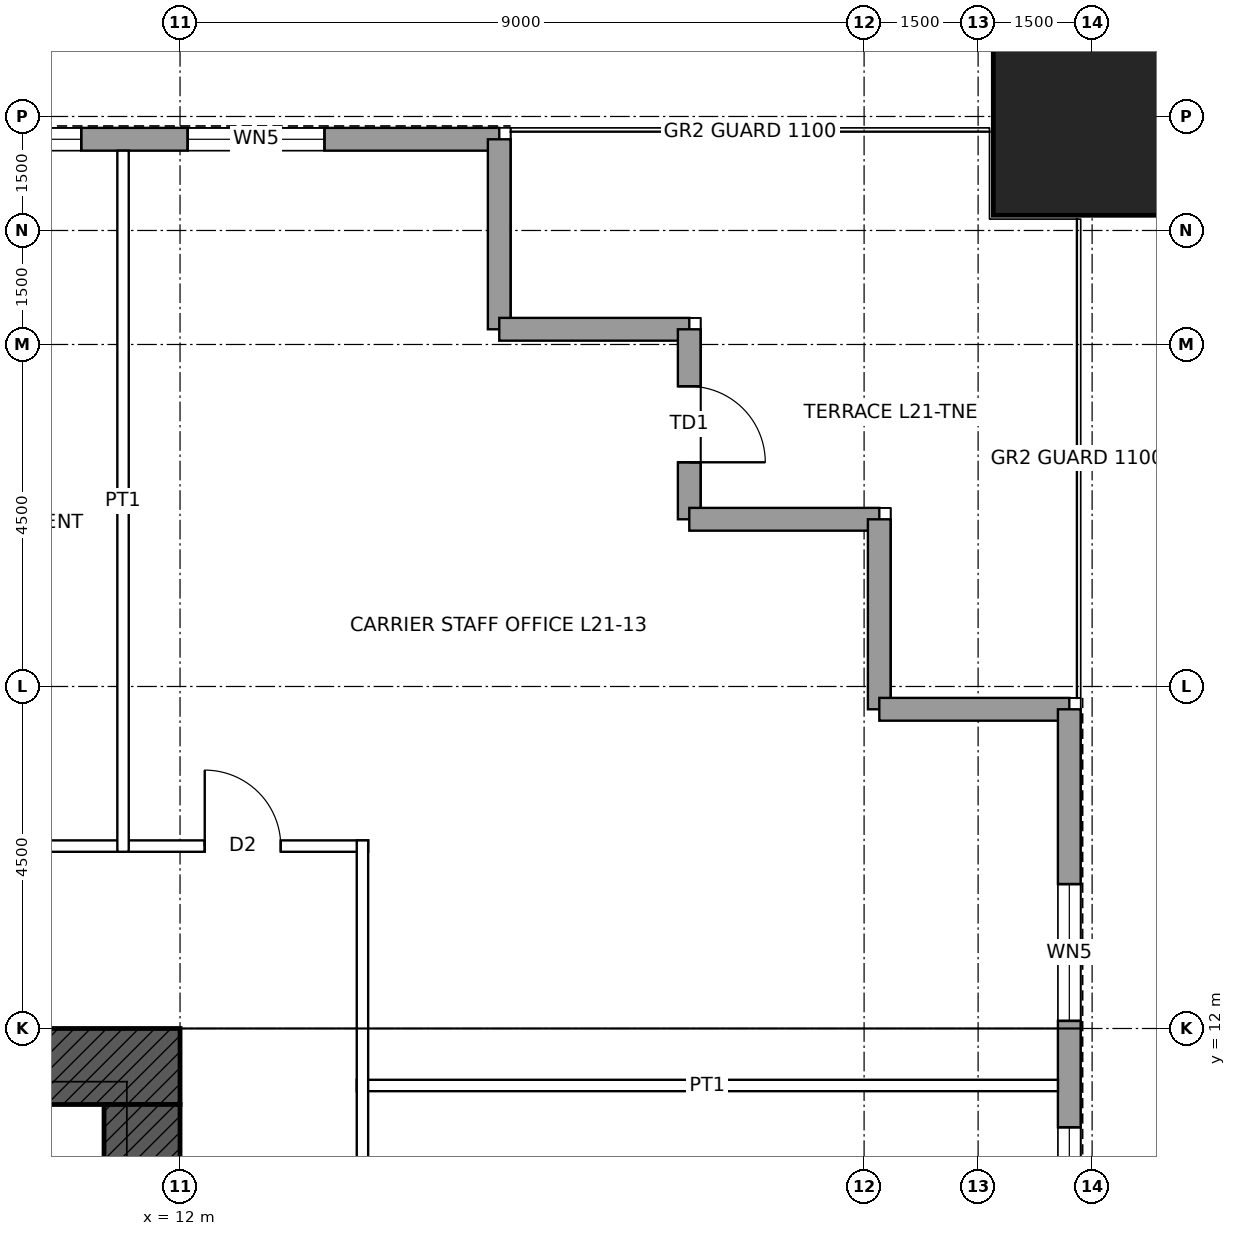
"""IFC4 building model, lengths in metres.
Left out: names, types, materials, properties, quantities, classifications, styles, units other than length and angle.
Written with IfcOpenShell. Run it as: python <this file> out.ifc"""

import sys

from ifc_helpers import new_model, si_unit, direction, frame, frame_2d, origin, origin_2d, place, context, subcontext, project, spatial, rectangle, hollow_rectangle, extrude, element, fill, save


model = new_model("IFC4")
c1 = context("Model", 3, precision=1e-05, world=origin(), true_north=direction((0.0, 1.0)))
c2 = subcontext(c1, "Body", "Model", "MODEL_VIEW")
j1 = project(units=[si_unit("LENGTHUNIT", "METRE"), si_unit("PLANEANGLEUNIT", "RADIAN")], contexts=[c1])
p1 = place(None, origin())
s1 = spatial("IfcSite", under=j1, at=p1, CompositionType="ELEMENT")
p2 = place(p1, origin())
s2 = spatial("IfcBuilding", under=s1, at=p2, CompositionType="ELEMENT")
p3 = place(p2, frame((0.0, 0.0, 108.9)))
s3 = spatial("IfcBuildingStorey", under=s2, at=p3, CompositionType="ELEMENT", Elevation=108.9)
p4 = place(p3, frame((24.0, 24.0, 0.0), z_axis=(0.0, 0.0, 1.0), x_axis=(1.0, 0.0, 0.0)))
e1 = element("IfcColumn", 1, at=p4, inside=s3, PredefinedType="COLUMN", context=c2, shape_type="SweptSolid", body=[
    extrude(hollow_rectangle(XDim=2.6, YDim=2.6, WallThickness=0.13, at=origin_2d()), origin(), (0.0, 0.0, 1.0), 4.5),
])
p5 = place(p3, frame((-12.0, 11.5, 0.0), z_axis=(0.0, 0.0, 1.0), x_axis=(1.0, 0.0, 0.0)))
e2 = element("IfcWall", 2, at=p5, inside=s3, PredefinedType="SHEAR", context=c2, shape_type="SweptSolid", body=[
    extrude(rectangle(XDim=24.0, YDim=1.0, at=frame_2d((12.0, 0.0))), origin(), (0.0, 0.0, 1.0), 4.5),
])
p6 = place(p5, frame((6.25, 0.0, 0.0)))
e3 = element("IfcOpeningElement", 3, at=p6, cuts=e2, PredefinedType="OPENING", context=c2, shape_type="SweptSolid", body=[
    extrude(rectangle(XDim=1.0, YDim=2.4, at=frame_2d((0.5, 1.2))), frame((0.0, 0.51, 0.0), z_axis=(0.0, -1.0, 0.0), x_axis=(1.0, 0.0, 0.0)), (0.0, 0.0, 1.0), 1.02),
])
p7 = place(p5, frame((16.75, 0.0, 0.0)))
e4 = element("IfcOpeningElement", 4, at=p7, cuts=e2, PredefinedType="OPENING", context=c2, shape_type="SweptSolid", body=[
    extrude(rectangle(XDim=1.0, YDim=2.4, at=frame_2d((0.5, 1.2))), frame((0.0, 0.51, 0.0), z_axis=(0.0, -1.0, 0.0), x_axis=(1.0, 0.0, 0.0)), (0.0, 0.0, 1.0), 1.02),
])
p8 = place(p3, frame((11.5, 11.0, 0.0), z_axis=(0.0, 0.0, 1.0), x_axis=(0.0, -1.0, 0.0)))
e5 = element("IfcWall", 5, at=p8, inside=s3, PredefinedType="SHEAR", context=c2, shape_type="SweptSolid", body=[
    extrude(rectangle(XDim=22.0, YDim=1.0, at=frame_2d((11.0, 0.0))), origin(), (0.0, 0.0, 1.0), 4.5),
])
p9 = place(p8, frame((10.5, 0.0, 0.0)))
e6 = element("IfcOpeningElement", 6, at=p9, cuts=e5, PredefinedType="OPENING", context=c2, shape_type="SweptSolid", body=[
    extrude(rectangle(XDim=1.0, YDim=2.4, at=frame_2d((0.5, 1.2))), frame((0.0, 0.51, 0.0), z_axis=(0.0, -1.0, 0.0), x_axis=(1.0, 0.0, 0.0)), (0.0, 0.0, 1.0), 1.02),
])
p10 = place(p3, frame((-16.2, 23.7, 0.0), z_axis=(0.0, 0.0, 1.0), x_axis=(1.0, 0.0, 0.0)))
e7 = element("IfcWall", 7, at=p10, inside=s3, PredefinedType="SOLIDWALL", context=c2, shape_type="SweptSolid", body=[
    extrude(rectangle(XDim=32.4, YDim=0.3, at=frame_2d((16.2, 0.0))), origin(), (0.0, 0.0, 1.0), 4.3),
])
p11 = place(p10, frame((2.3, 0.0, 1.0)))
e8 = element("IfcOpeningElement", 8, at=p11, cuts=e7, PredefinedType="OPENING", context=c2, shape_type="SweptSolid", body=[
    extrude(rectangle(XDim=1.8, YDim=1.2, at=frame_2d((0.9, 0.6))), frame((0.0, 0.16, 0.0), z_axis=(0.0, -1.0, 0.0), x_axis=(1.0, 0.0, 0.0)), (0.0, 0.0, 1.0), 0.32),
])
p12 = place(p10, frame((5.5, 0.0, 1.0)))
e9 = element("IfcOpeningElement", 9, at=p12, cuts=e7, PredefinedType="OPENING", context=c2, shape_type="SweptSolid", body=[
    extrude(rectangle(XDim=2.4, YDim=1.2, at=frame_2d((1.2, 0.6))), frame((0.0, 0.16, 0.0), z_axis=(0.0, -1.0, 0.0), x_axis=(1.0, 0.0, 0.0)), (0.0, 0.0, 1.0), 0.32),
])
p13 = place(p10, frame((9.5, 0.0, 1.0)))
e10 = element("IfcOpeningElement", 10, at=p13, cuts=e7, PredefinedType="OPENING", context=c2, shape_type="SweptSolid", body=[
    extrude(rectangle(XDim=2.4, YDim=1.2, at=frame_2d((1.2, 0.6))), frame((0.0, 0.16, 0.0), z_axis=(0.0, -1.0, 0.0), x_axis=(1.0, 0.0, 0.0)), (0.0, 0.0, 1.0), 0.32),
])
p14 = place(p10, frame((13.0, 0.0, 1.0)))
e11 = element("IfcOpeningElement", 11, at=p14, cuts=e7, PredefinedType="OPENING", context=c2, shape_type="SweptSolid", body=[
    extrude(rectangle(XDim=2.4, YDim=1.2, at=frame_2d((1.2, 0.6))), frame((0.0, 0.16, 0.0), z_axis=(0.0, -1.0, 0.0), x_axis=(1.0, 0.0, 0.0)), (0.0, 0.0, 1.0), 0.32),
])
p15 = place(p10, frame((17.0, 0.0, 1.0)))
e12 = element("IfcOpeningElement", 12, at=p15, cuts=e7, PredefinedType="OPENING", context=c2, shape_type="SweptSolid", body=[
    extrude(rectangle(XDim=2.4, YDim=1.2, at=frame_2d((1.2, 0.6))), frame((0.0, 0.16, 0.0), z_axis=(0.0, -1.0, 0.0), x_axis=(1.0, 0.0, 0.0)), (0.0, 0.0, 1.0), 0.32),
])
p16 = place(p10, frame((20.5, 0.0, 1.0)))
e13 = element("IfcOpeningElement", 13, at=p16, cuts=e7, PredefinedType="OPENING", context=c2, shape_type="SweptSolid", body=[
    extrude(rectangle(XDim=2.4, YDim=1.2, at=frame_2d((1.2, 0.6))), frame((0.0, 0.16, 0.0), z_axis=(0.0, -1.0, 0.0), x_axis=(1.0, 0.0, 0.0)), (0.0, 0.0, 1.0), 0.32),
])
p17 = place(p10, frame((24.5, 0.0, 1.0)))
e14 = element("IfcOpeningElement", 14, at=p17, cuts=e7, PredefinedType="OPENING", context=c2, shape_type="SweptSolid", body=[
    extrude(rectangle(XDim=2.4, YDim=1.2, at=frame_2d((1.2, 0.6))), frame((0.0, 0.16, 0.0), z_axis=(0.0, -1.0, 0.0), x_axis=(1.0, 0.0, 0.0)), (0.0, 0.0, 1.0), 0.32),
])
p18 = place(p10, frame((28.3, 0.0, 1.0)))
e15 = element("IfcOpeningElement", 15, at=p18, cuts=e7, PredefinedType="OPENING", context=c2, shape_type="SweptSolid", body=[
    extrude(rectangle(XDim=1.8, YDim=1.2, at=frame_2d((0.9, 0.6))), frame((0.0, 0.16, 0.0), z_axis=(0.0, -1.0, 0.0), x_axis=(1.0, 0.0, 0.0)), (0.0, 0.0, 1.0), 0.32),
])
for number, where, z_axis, x_axis in (
    (16, (16.2, 23.7, 0.0), (0.0, 0.0, 1.0), (0.0, -1.0, 0.0)),
    (17, (16.2, 21.2, 0.0), (0.0, 0.0, 1.0), (1.0, 0.0, 0.0)),
):
    element("IfcWall", number, at=place(p3, frame(where, z_axis=z_axis, x_axis=x_axis)), inside=s3, PredefinedType="SOLIDWALL", context=c2, shape_type="SweptSolid", body=[
        extrude(rectangle(XDim=2.5, YDim=0.3, at=frame_2d((1.25, 0.0))), origin(), (0.0, 0.0, 1.0), 4.3),
    ])
p19 = place(p3, frame((18.7, 21.2, 0.0), z_axis=(0.0, 0.0, 1.0), x_axis=(0.0, -1.0, 0.0)))
e18 = element("IfcWall", 18, at=p19, inside=s3, PredefinedType="SOLIDWALL", context=c2, shape_type="SweptSolid", body=[
    extrude(rectangle(XDim=2.5, YDim=0.3, at=frame_2d((1.25, 0.0))), origin(), (0.0, 0.0, 1.0), 4.3),
])
p20 = place(p19, frame((0.75, 0.0, 0.0)))
e19 = element("IfcOpeningElement", 19, at=p20, cuts=e18, PredefinedType="OPENING", context=c2, shape_type="SweptSolid", body=[
    extrude(rectangle(XDim=1.0, YDim=2.4, at=frame_2d((0.5, 1.2))), frame((0.0, 0.16, 0.0), z_axis=(0.0, -1.0, 0.0), x_axis=(1.0, 0.0, 0.0)), (0.0, 0.0, 1.0), 0.32),
])
for number, where, z_axis, x_axis in (
    (20, (18.7, 18.7, 0.0), (0.0, 0.0, 1.0), (1.0, 0.0, 0.0)),
    (21, (21.2, 18.7, 0.0), (0.0, 0.0, 1.0), (0.0, -1.0, 0.0)),
    (22, (21.2, 16.2, 0.0), (0.0, 0.0, 1.0), (1.0, 0.0, 0.0)),
):
    element("IfcWall", number, at=place(p3, frame(where, z_axis=z_axis, x_axis=x_axis)), inside=s3, PredefinedType="SOLIDWALL", context=c2, shape_type="SweptSolid", body=[
        extrude(rectangle(XDim=2.5, YDim=0.3, at=frame_2d((1.25, 0.0))), origin(), (0.0, 0.0, 1.0), 4.3),
    ])
p21 = place(p3, frame((23.7, 16.2, 0.0), z_axis=(0.0, 0.0, 1.0), x_axis=(0.0, -1.0, 0.0)))
e23 = element("IfcWall", 23, at=p21, inside=s3, PredefinedType="SOLIDWALL", context=c2, shape_type="SweptSolid", body=[
    extrude(rectangle(XDim=32.4, YDim=0.3, at=frame_2d((16.2, 0.0))), origin(), (0.0, 0.0, 1.0), 4.3),
])
p22 = place(p21, frame((2.3, 0.0, 1.0)))
e24 = element("IfcOpeningElement", 24, at=p22, cuts=e23, PredefinedType="OPENING", context=c2, shape_type="SweptSolid", body=[
    extrude(rectangle(XDim=1.8, YDim=1.2, at=frame_2d((0.9, 0.6))), frame((0.0, 0.16, 0.0), z_axis=(0.0, -1.0, 0.0), x_axis=(1.0, 0.0, 0.0)), (0.0, 0.0, 1.0), 0.32),
])
p23 = place(p21, frame((5.5, 0.0, 1.0)))
e25 = element("IfcOpeningElement", 25, at=p23, cuts=e23, PredefinedType="OPENING", context=c2, shape_type="SweptSolid", body=[
    extrude(rectangle(XDim=2.4, YDim=1.2, at=frame_2d((1.2, 0.6))), frame((0.0, 0.16, 0.0), z_axis=(0.0, -1.0, 0.0), x_axis=(1.0, 0.0, 0.0)), (0.0, 0.0, 1.0), 0.32),
])
p24 = place(p21, frame((9.5, 0.0, 1.0)))
e26 = element("IfcOpeningElement", 26, at=p24, cuts=e23, PredefinedType="OPENING", context=c2, shape_type="SweptSolid", body=[
    extrude(rectangle(XDim=2.4, YDim=1.2, at=frame_2d((1.2, 0.6))), frame((0.0, 0.16, 0.0), z_axis=(0.0, -1.0, 0.0), x_axis=(1.0, 0.0, 0.0)), (0.0, 0.0, 1.0), 0.32),
])
p25 = place(p21, frame((13.0, 0.0, 1.0)))
e27 = element("IfcOpeningElement", 27, at=p25, cuts=e23, PredefinedType="OPENING", context=c2, shape_type="SweptSolid", body=[
    extrude(rectangle(XDim=2.4, YDim=1.2, at=frame_2d((1.2, 0.6))), frame((0.0, 0.16, 0.0), z_axis=(0.0, -1.0, 0.0), x_axis=(1.0, 0.0, 0.0)), (0.0, 0.0, 1.0), 0.32),
])
p26 = place(p21, frame((17.0, 0.0, 1.0)))
e28 = element("IfcOpeningElement", 28, at=p26, cuts=e23, PredefinedType="OPENING", context=c2, shape_type="SweptSolid", body=[
    extrude(rectangle(XDim=2.4, YDim=1.2, at=frame_2d((1.2, 0.6))), frame((0.0, 0.16, 0.0), z_axis=(0.0, -1.0, 0.0), x_axis=(1.0, 0.0, 0.0)), (0.0, 0.0, 1.0), 0.32),
])
p27 = place(p21, frame((20.5, 0.0, 1.0)))
e29 = element("IfcOpeningElement", 29, at=p27, cuts=e23, PredefinedType="OPENING", context=c2, shape_type="SweptSolid", body=[
    extrude(rectangle(XDim=2.4, YDim=1.2, at=frame_2d((1.2, 0.6))), frame((0.0, 0.16, 0.0), z_axis=(0.0, -1.0, 0.0), x_axis=(1.0, 0.0, 0.0)), (0.0, 0.0, 1.0), 0.32),
])
p28 = place(p21, frame((24.5, 0.0, 1.0)))
e30 = element("IfcOpeningElement", 30, at=p28, cuts=e23, PredefinedType="OPENING", context=c2, shape_type="SweptSolid", body=[
    extrude(rectangle(XDim=2.4, YDim=1.2, at=frame_2d((1.2, 0.6))), frame((0.0, 0.16, 0.0), z_axis=(0.0, -1.0, 0.0), x_axis=(1.0, 0.0, 0.0)), (0.0, 0.0, 1.0), 0.32),
])
p29 = place(p21, frame((28.3, 0.0, 1.0)))
e31 = element("IfcOpeningElement", 31, at=p29, cuts=e23, PredefinedType="OPENING", context=c2, shape_type="SweptSolid", body=[
    extrude(rectangle(XDim=1.8, YDim=1.2, at=frame_2d((0.9, 0.6))), frame((0.0, 0.16, 0.0), z_axis=(0.0, -1.0, 0.0), x_axis=(1.0, 0.0, 0.0)), (0.0, 0.0, 1.0), 0.32),
])
p30 = place(p3, frame((14.325, 11.25, 0.0), z_axis=(0.0, 0.0, 1.0), x_axis=(1.0, 0.0, 0.0)))
e32 = element("IfcWall", 32, at=p30, inside=s3, PredefinedType="PARTITIONING", context=c2, shape_type="SweptSolid", body=[
    extrude(rectangle(XDim=9.225, YDim=0.15, at=frame_2d((4.613, 0.0))), origin(), (0.0, 0.0, 1.0), 3.431),
])
p31 = place(p3, frame((-14.475, 14.4, 0.0), z_axis=(0.0, 0.0, 1.0), x_axis=(1.0, 0.0, 0.0)))
e33 = element("IfcWall", 33, at=p31, inside=s3, PredefinedType="PARTITIONING", context=c2, shape_type="SweptSolid", body=[
    extrude(rectangle(XDim=28.95, YDim=0.15, at=frame_2d((14.475, 0.0))), origin(), (0.0, 0.0, 1.0), 4.3),
])
p32 = place(p31, frame((4.2, 0.0, 0.0)))
e34 = element("IfcOpeningElement", 34, at=p32, cuts=e33, PredefinedType="OPENING", context=c2, shape_type="SweptSolid", body=[
    extrude(rectangle(XDim=1.8, YDim=2.4, at=frame_2d((0.9, 1.2))), frame((0.0, 0.085, 0.0), z_axis=(0.0, -1.0, 0.0), x_axis=(1.0, 0.0, 0.0)), (0.0, 0.0, 1.0), 0.17),
])
p33 = place(p31, frame((9.825, 0.0, 0.0)))
e35 = element("IfcOpeningElement", 35, at=p33, cuts=e33, PredefinedType="OPENING", context=c2, shape_type="SweptSolid", body=[
    extrude(rectangle(XDim=1.8, YDim=2.4, at=frame_2d((0.9, 1.2))), frame((0.0, 0.085, 0.0), z_axis=(0.0, -1.0, 0.0), x_axis=(1.0, 0.0, 0.0)), (0.0, 0.0, 1.0), 0.17),
])
p34 = place(p31, frame((17.325, 0.0, 0.0)))
e36 = element("IfcOpeningElement", 36, at=p34, cuts=e33, PredefinedType="OPENING", context=c2, shape_type="SweptSolid", body=[
    extrude(rectangle(XDim=1.8, YDim=2.4, at=frame_2d((0.9, 1.2))), frame((0.0, 0.085, 0.0), z_axis=(0.0, -1.0, 0.0), x_axis=(1.0, 0.0, 0.0)), (0.0, 0.0, 1.0), 0.17),
])
p35 = place(p31, frame((22.95, 0.0, 0.0)))
e37 = element("IfcOpeningElement", 37, at=p35, cuts=e33, PredefinedType="OPENING", context=c2, shape_type="SweptSolid", body=[
    extrude(rectangle(XDim=1.8, YDim=2.4, at=frame_2d((0.9, 1.2))), frame((0.0, 0.085, 0.0), z_axis=(0.0, -1.0, 0.0), x_axis=(1.0, 0.0, 0.0)), (0.0, 0.0, 1.0), 0.17),
])
p36 = place(p31, frame((26.8, 0.0, 0.0)))
e38 = element("IfcOpeningElement", 38, at=p36, cuts=e33, PredefinedType="OPENING", context=c2, shape_type="SweptSolid", body=[
    extrude(rectangle(XDim=1.0, YDim=2.1, at=frame_2d((0.5, 1.05))), frame((0.0, 0.085, 0.0), z_axis=(0.0, -1.0, 0.0), x_axis=(1.0, 0.0, 0.0)), (0.0, 0.0, 1.0), 0.17),
])
p37 = place(p31, frame((1.15, 0.0, 0.0)))
e39 = element("IfcOpeningElement", 39, at=p37, cuts=e33, PredefinedType="OPENING", context=c2, shape_type="SweptSolid", body=[
    extrude(rectangle(XDim=1.0, YDim=2.1, at=frame_2d((0.5, 1.05))), frame((0.0, 0.085, 0.0), z_axis=(0.0, -1.0, 0.0), x_axis=(1.0, 0.0, 0.0)), (0.0, 0.0, 1.0), 0.17),
])
p38 = place(p3, frame((11.25, 14.325, 0.0), z_axis=(0.0, 0.0, 1.0), x_axis=(0.0, 1.0, 0.0)))
e40 = element("IfcWall", 40, at=p38, inside=s3, PredefinedType="PARTITIONING", context=c2, shape_type="SweptSolid", body=[
    extrude(rectangle(XDim=9.225, YDim=0.15, at=frame_2d((4.613, 0.0))), origin(), (0.0, 0.0, 1.0), 3.431),
])
p39 = place(p3, frame((14.4, -14.475, 0.0), z_axis=(0.0, 0.0, 1.0), x_axis=(0.0, 1.0, 0.0)))
e41 = element("IfcWall", 41, at=p39, inside=s3, PredefinedType="PARTITIONING", context=c2, shape_type="SweptSolid", body=[
    extrude(rectangle(XDim=28.95, YDim=0.15, at=frame_2d((14.475, 0.0))), origin(), (0.0, 0.0, 1.0), 4.3),
])
p40 = place(p39, frame((19.2, 0.0, 0.0)))
e42 = element("IfcOpeningElement", 42, at=p40, cuts=e41, PredefinedType="OPENING", context=c2, shape_type="SweptSolid", body=[
    extrude(rectangle(XDim=1.8, YDim=2.4, at=frame_2d((0.9, 1.2))), frame((0.0, 0.085, 0.0), z_axis=(0.0, -1.0, 0.0), x_axis=(1.0, 0.0, 0.0)), (0.0, 0.0, 1.0), 0.17),
])
p41 = place(p39, frame((7.95, 0.0, 0.0)))
e43 = element("IfcOpeningElement", 43, at=p41, cuts=e41, PredefinedType="OPENING", context=c2, shape_type="SweptSolid", body=[
    extrude(rectangle(XDim=1.8, YDim=2.4, at=frame_2d((0.9, 1.2))), frame((0.0, 0.085, 0.0), z_axis=(0.0, -1.0, 0.0), x_axis=(1.0, 0.0, 0.0)), (0.0, 0.0, 1.0), 0.17),
])
p42 = place(p17, origin())
e44 = element("IfcWindow", 44, at=p42, inside=s3, PartitioningType="SINGLE_PANEL", PredefinedType="WINDOW", context=c2, shape_type="SweptSolid", body=[
    extrude(rectangle(XDim=2.4, YDim=1.2, at=frame_2d((1.2, 0.6))), frame((0.0, 0.03, 0.0), z_axis=(0.0, -1.0, 0.0), x_axis=(1.0, 0.0, 0.0)), (0.0, 0.0, 1.0), 0.06),
])
fill(e14, e44)
p43 = place(p18, origin())
e45 = element("IfcWindow", 45, at=p43, inside=s3, PartitioningType="SINGLE_PANEL", PredefinedType="WINDOW", context=c2, shape_type="SweptSolid", body=[
    extrude(rectangle(XDim=1.8, YDim=1.2, at=frame_2d((0.9, 0.6))), frame((0.0, 0.03, 0.0), z_axis=(0.0, -1.0, 0.0), x_axis=(1.0, 0.0, 0.0)), (0.0, 0.0, 1.0), 0.06),
])
fill(e15, e45)
p44 = place(p20, origin())
e46 = element("IfcDoor", 46, at=p44, inside=s3, OperationType="SINGLE_SWING_RIGHT", PredefinedType="DOOR", context=c2, shape_type="SweptSolid", body=[
    extrude(rectangle(XDim=1.0, YDim=2.4, at=frame_2d((0.5, 1.2))), frame((0.0, 0.025, 0.0), z_axis=(0.0, -1.0, 0.0), x_axis=(1.0, 0.0, 0.0)), (0.0, 0.0, 1.0), 0.05),
])
fill(e19, e46)
p45 = place(p22, origin())
e47 = element("IfcWindow", 47, at=p45, inside=s3, PartitioningType="SINGLE_PANEL", PredefinedType="WINDOW", context=c2, shape_type="SweptSolid", body=[
    extrude(rectangle(XDim=1.8, YDim=1.2, at=frame_2d((0.9, 0.6))), frame((0.0, 0.03, 0.0), z_axis=(0.0, -1.0, 0.0), x_axis=(1.0, 0.0, 0.0)), (0.0, 0.0, 1.0), 0.06),
])
fill(e24, e47)
p46 = place(p23, origin())
e48 = element("IfcWindow", 48, at=p46, inside=s3, PartitioningType="SINGLE_PANEL", PredefinedType="WINDOW", context=c2, shape_type="SweptSolid", body=[
    extrude(rectangle(XDim=2.4, YDim=1.2, at=frame_2d((1.2, 0.6))), frame((0.0, 0.03, 0.0), z_axis=(0.0, -1.0, 0.0), x_axis=(1.0, 0.0, 0.0)), (0.0, 0.0, 1.0), 0.06),
])
fill(e25, e48)
p47 = place(p36, origin())
e49 = element("IfcDoor", 49, at=p47, inside=s3, OperationType="SINGLE_SWING_LEFT", PredefinedType="DOOR", context=c2, shape_type="SweptSolid", body=[
    extrude(rectangle(XDim=1.0, YDim=2.1, at=frame_2d((0.5, 1.05))), frame((0.0, 0.025, 0.0), z_axis=(0.0, -1.0, 0.0), x_axis=(1.0, 0.0, 0.0)), (0.0, 0.0, 1.0), 0.05),
])
fill(e38, e49)
save(model, sys.argv[1])
